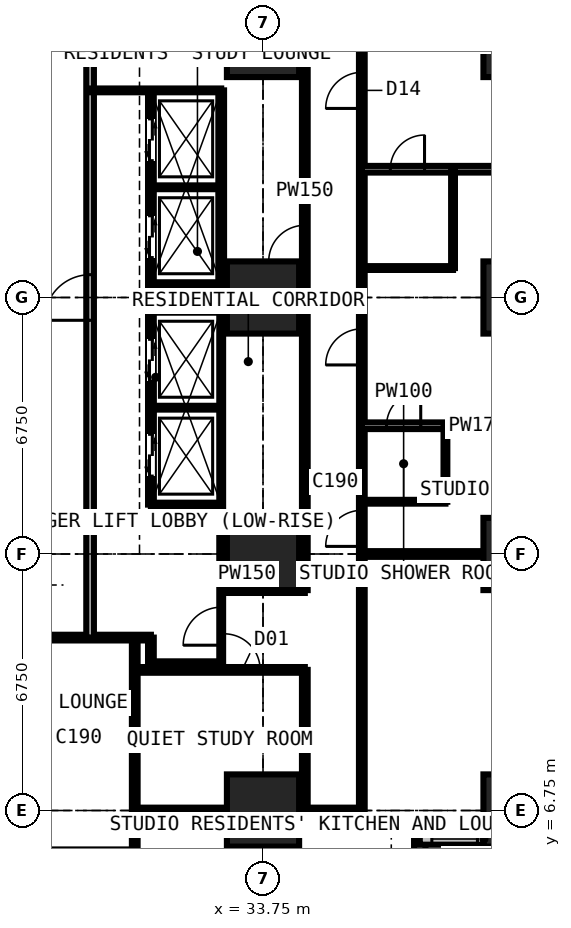
"""IFC4 building model, lengths in metres.
Left out: names, types, materials, properties, quantities, classifications, styles, units other than length and angle.
Written with IfcOpenShell. Run it as: python <this file> out.ifc"""

import sys

from ifc_helpers import new_model, si_unit, direction, frame, frame_2d, origin, origin_2d, place, context, subcontext, project, spatial, rectangle, extrude, element, fill, save


model = new_model("IFC4")
c1 = context("Model", 3, precision=1e-05, world=origin(), true_north=direction((0.0, 1.0)))
c2 = subcontext(c1, "Body", "Model", "MODEL_VIEW")
j1 = project(units=[si_unit("LENGTHUNIT", "METRE"), si_unit("PLANEANGLEUNIT", "RADIAN")], contexts=[c1])
p1 = place(None, origin())
s1 = spatial("IfcSite", under=j1, at=p1, CompositionType="ELEMENT")
p2 = place(p1, origin())
s2 = spatial("IfcBuilding", under=s1, at=p2, CompositionType="ELEMENT")
p3 = place(p2, frame((0.0, 0.0, 28.8)))
s3 = spatial("IfcBuildingStorey", under=s2, at=p3, CompositionType="ELEMENT", Elevation=28.8)
for number, where, z_axis, x_axis in (
    (1, (33.75, 6.75, 0.0), (0.0, 0.0, 1.0), (1.0, 0.0, 0.0)),
    (2, (33.75, 13.5, 0.0), (0.0, 0.0, 1.0), (1.0, 0.0, 0.0)),
    (3, (33.75, 20.25, 0.0), (0.0, 0.0, 1.0), (1.0, 0.0, 0.0)),
    (4, (33.75, 27.0, 0.0), (0.0, 0.0, 1.0), (1.0, 0.0, 0.0)),
    (5, (40.5, 6.75, 0.0), (0.0, 0.0, 1.0), (1.0, 0.0, 0.0)),
    (6, (40.5, 13.5, 0.0), (0.0, 0.0, 1.0), (1.0, 0.0, 0.0)),
    (7, (40.5, 20.25, 0.0), (0.0, 0.0, 1.0), (1.0, 0.0, 0.0)),
    (8, (40.5, 27.0, 0.0), (0.0, 0.0, 1.0), (1.0, 0.0, 0.0)),
):
    element("IfcColumn", number, at=place(p3, frame(where, z_axis=z_axis, x_axis=x_axis)), inside=s3, PredefinedType="COLUMN", context=c2, shape_type="SweptSolid", body=[
        extrude(rectangle(XDim=1.9, YDim=1.9, at=origin_2d()), origin(), (0.0, 0.0, 1.0), 3.6),
    ])
p4 = place(p3, frame((37.875, 2.625, 0.0), z_axis=(0.0, 0.0, 1.0), x_axis=(0.0, 1.0, 0.0)))
e9 = element("IfcWall", 9, at=p4, inside=s3, PredefinedType="SOLIDWALL", context=c2, shape_type="SweptSolid", body=[
    extrude(rectangle(XDim=3.375, YDim=0.3, at=frame_2d((1.688, 0.0))), origin(), (0.0, 0.0, 1.0), 3.375),
])
p5 = place(p4, frame((0.788, 0.0, 0.6)))
e10 = element("IfcOpeningElement", 10, at=p5, cuts=e9, PredefinedType="OPENING", context=c2, shape_type="SweptSolid", body=[
    extrude(rectangle(XDim=1.8, YDim=2.1, at=frame_2d((0.9, 1.05))), frame((0.0, 0.16, 0.0), z_axis=(0.0, -1.0, 0.0), x_axis=(1.0, 0.0, 0.0)), (0.0, 0.0, 1.0), 0.32),
])
p6 = place(p3, frame((37.875, 6.0, 0.0), z_axis=(0.0, 0.0, 1.0), x_axis=(1.0, 0.0, 0.0)))
e11 = element("IfcWall", 11, at=p6, inside=s3, PredefinedType="SOLIDWALL", context=c2, shape_type="SweptSolid", body=[
    extrude(rectangle(XDim=3.375, YDim=0.3, at=frame_2d((1.688, 0.0))), origin(), (0.0, 0.0, 1.0), 3.375),
])
p7 = place(p6, frame((0.317, 0.0, 0.9)))
e12 = element("IfcOpeningElement", 12, at=p7, cuts=e11, PredefinedType="OPENING", context=c2, shape_type="SweptSolid", body=[
    extrude(rectangle(XDim=1.2, YDim=1.8, at=frame_2d((0.6, 0.9))), frame((0.0, 0.16, 0.0), z_axis=(0.0, -1.0, 0.0), x_axis=(1.0, 0.0, 0.0)), (0.0, 0.0, 1.0), 0.32),
])
p8 = place(p3, frame((10.125, 11.3, 0.0), z_axis=(0.0, 0.0, 1.0), x_axis=(1.0, 0.0, 0.0)))
e13 = element("IfcWall", 13, at=p8, inside=s3, PredefinedType="PARTITIONING", context=c2, shape_type="SweptSolid", body=[
    extrude(rectangle(XDim=20.675, YDim=0.15, at=frame_2d((10.337, 0.0))), origin(), (0.0, 0.0, 1.0), 3.375),
])
p9 = place(p8, frame((1.775, 0.0, 0.0)))
e14 = element("IfcOpeningElement", 14, at=p9, cuts=e13, PredefinedType="OPENING", context=c2, shape_type="SweptSolid", body=[
    extrude(rectangle(XDim=1.0, YDim=2.2, at=frame_2d((0.5, 1.1))), frame((0.0, 0.085, 0.0), z_axis=(0.0, -1.0, 0.0), x_axis=(1.0, 0.0, 0.0)), (0.0, 0.0, 1.0), 0.17),
])
p10 = place(p8, frame((11.312, 0.0, 0.0)))
e15 = element("IfcOpeningElement", 15, at=p10, cuts=e13, PredefinedType="OPENING", context=c2, shape_type="SweptSolid", body=[
    extrude(rectangle(XDim=1.0, YDim=2.2, at=frame_2d((0.5, 1.1))), frame((0.0, 0.085, 0.0), z_axis=(0.0, -1.0, 0.0), x_axis=(1.0, 0.0, 0.0)), (0.0, 0.0, 1.0), 0.17),
])
p11 = place(p3, frame((29.2, 11.3, 0.0), z_axis=(0.0, 0.0, 1.0), x_axis=(0.0, 1.0, 0.0)))
e16 = element("IfcWall", 16, at=p11, inside=s3, PredefinedType="PARTITIONING", context=c2, shape_type="SweptSolid", body=[
    extrude(rectangle(XDim=17.9, YDim=0.2, at=frame_2d((8.95, 0.0))), origin(), (0.0, 0.0, 1.0), 3.375),
])
p12 = place(p11, frame((8.35, 0.0, 0.0)))
e17 = element("IfcOpeningElement", 17, at=p12, cuts=e16, PredefinedType="OPENING", context=c2, shape_type="SweptSolid", body=[
    extrude(rectangle(XDim=1.2, YDim=2.2, at=frame_2d((0.6, 1.1))), frame((0.0, 0.11, 0.0), z_axis=(0.0, -1.0, 0.0), x_axis=(1.0, 0.0, 0.0)), (0.0, 0.0, 1.0), 0.22),
])
p13 = place(p3, frame((29.2, 25.7, 0.0), z_axis=(0.0, 0.0, 1.0), x_axis=(1.0, 0.0, 0.0)))
e18 = element("IfcWall", 18, at=p13, inside=s3, PredefinedType="SHEAR", context=c2, shape_type="SweptSolid", body=[
    extrude(rectangle(XDim=3.45, YDim=0.1, at=frame_2d((1.725, 0.0))), origin(), (0.0, 0.0, 1.0), 3.375),
])
p14 = place(p3, frame((30.375, -0.734, 0.0), z_axis=(0.0, 0.0, 1.0), x_axis=(0.0, 1.0, 0.0)))
e19 = element("IfcWall", 19, at=p14, inside=s3, PredefinedType="PARTITIONING", context=c2, shape_type="SweptSolid", body=[
    extrude(rectangle(XDim=12.034, YDim=0.15, at=frame_2d((6.017, 0.0))), origin(), (0.0, 0.0, 1.0), 3.375),
])
p15 = place(p14, frame((5.134, 0.0, 0.0)))
e20 = element("IfcOpeningElement", 20, at=p15, cuts=e19, PredefinedType="OPENING", context=c2, shape_type="SweptSolid", body=[
    extrude(rectangle(XDim=1.0, YDim=2.2, at=frame_2d((0.5, 1.1))), frame((0.0, 0.085, 0.0), z_axis=(0.0, -1.0, 0.0), x_axis=(1.0, 0.0, 0.0)), (0.0, 0.0, 1.0), 0.17),
])
p16 = place(p3, frame((30.375, 6.75, 0.0), z_axis=(0.0, 0.0, 1.0), x_axis=(1.0, 0.0, 0.0)))
e21 = element("IfcWall", 21, at=p16, inside=s3, PredefinedType="PARTITIONING", context=c2, shape_type="SweptSolid", body=[
    extrude(rectangle(XDim=5.975, YDim=0.15, at=frame_2d((2.988, 0.0))), origin(), (0.0, 0.0, 1.0), 2.877),
])
p17 = place(p3, frame((30.375, 10.45, 0.0), z_axis=(0.0, 0.0, 1.0), x_axis=(1.0, 0.0, 0.0)))
e22 = element("IfcWall", 22, at=p17, inside=s3, PredefinedType="PARTITIONING", context=c2, shape_type="SweptSolid", body=[
    extrude(rectangle(XDim=4.475, YDim=0.15, at=frame_2d((2.238, 0.0))), origin(), (0.0, 0.0, 1.0), 3.375),
])
p18 = place(p17, frame((2.35, 0.0, 0.0)))
e23 = element("IfcOpeningElement", 23, at=p18, cuts=e22, PredefinedType="OPENING", context=c2, shape_type="SweptSolid", body=[
    extrude(rectangle(XDim=0.95, YDim=2.2, at=frame_2d((0.475, 1.1))), frame((0.0, 0.085, 0.0), z_axis=(0.0, -1.0, 0.0), x_axis=(1.0, 0.0, 0.0)), (0.0, 0.0, 1.0), 0.17),
])
p19 = place(p3, frame((30.8, 10.6, 0.0), z_axis=(0.0, 0.0, 1.0), x_axis=(0.0, 1.0, 0.0)))
e24 = element("IfcWall", 24, at=p19, inside=s3, PredefinedType="PARTITIONING", context=c2, shape_type="SweptSolid", body=[
    extrude(rectangle(XDim=0.7, YDim=0.15, at=frame_2d((0.35, 0.0))), origin(), (0.0, 0.0, 1.0), 3.375),
])
p20 = place(p3, frame((30.8, 10.6, 0.0), z_axis=(0.0, 0.0, 1.0), x_axis=(1.0, 0.0, 0.0)))
e25 = element("IfcWall", 25, at=p20, inside=s3, PredefinedType="PARTITIONING", context=c2, shape_type="SweptSolid", body=[
    extrude(rectangle(XDim=1.85, YDim=0.15, at=frame_2d((0.925, 0.0))), origin(), (0.0, 0.0, 1.0), 3.375),
])
p21 = place(p3, frame((30.8, 14.8, 0.0), z_axis=(0.0, 0.0, 1.0), x_axis=(0.0, 1.0, 0.0)))
e26 = element("IfcWall", 26, at=p21, inside=s3, PredefinedType="PARTITIONING", context=c2, shape_type="SweptSolid", body=[
    extrude(rectangle(XDim=10.9, YDim=0.15, at=frame_2d((5.45, 0.0))), origin(), (0.0, 0.0, 1.0), 3.375),
])
p22 = place(p21, frame((0.75, 0.0, 0.0)))
e27 = element("IfcOpeningElement", 27, at=p22, cuts=e26, PredefinedType="OPENING", context=c2, shape_type="SweptSolid", body=[
    extrude(rectangle(XDim=1.1, YDim=2.2, at=frame_2d((0.55, 1.1))), frame((0.0, 0.085, 0.0), z_axis=(0.0, -1.0, 0.0), x_axis=(1.0, 0.0, 0.0)), (0.0, 0.0, 1.0), 0.17),
])
p23 = place(p21, frame((3.25, 0.0, 0.0)))
e28 = element("IfcOpeningElement", 28, at=p23, cuts=e26, PredefinedType="OPENING", context=c2, shape_type="SweptSolid", body=[
    extrude(rectangle(XDim=1.1, YDim=2.2, at=frame_2d((0.55, 1.1))), frame((0.0, 0.085, 0.0), z_axis=(0.0, -1.0, 0.0), x_axis=(1.0, 0.0, 0.0)), (0.0, 0.0, 1.0), 0.17),
])
p24 = place(p21, frame((6.5, 0.0, 0.0)))
e29 = element("IfcOpeningElement", 29, at=p24, cuts=e26, PredefinedType="OPENING", context=c2, shape_type="SweptSolid", body=[
    extrude(rectangle(XDim=1.1, YDim=2.2, at=frame_2d((0.55, 1.1))), frame((0.0, 0.085, 0.0), z_axis=(0.0, -1.0, 0.0), x_axis=(1.0, 0.0, 0.0)), (0.0, 0.0, 1.0), 0.17),
])
p25 = place(p21, frame((9.05, 0.0, 0.0)))
e30 = element("IfcOpeningElement", 30, at=p25, cuts=e26, PredefinedType="OPENING", context=c2, shape_type="SweptSolid", body=[
    extrude(rectangle(XDim=1.1, YDim=2.2, at=frame_2d((0.55, 1.1))), frame((0.0, 0.085, 0.0), z_axis=(0.0, -1.0, 0.0), x_axis=(1.0, 0.0, 0.0)), (0.0, 0.0, 1.0), 0.17),
])
for number, where, z_axis, x_axis in (
    (31, (30.8, 14.8, 0.0), (0.0, 0.0, 1.0), (1.0, 0.0, 0.0)),
    (32, (30.8, 17.35, 0.0), (0.0, 0.0, 1.0), (1.0, 0.0, 0.0)),
    (33, (30.8, 19.9, 0.0), (0.0, 0.0, 1.0), (1.0, 0.0, 0.0)),
    (34, (30.8, 20.6, 0.0), (0.0, 0.0, 1.0), (1.0, 0.0, 0.0)),
    (35, (30.8, 23.15, 0.0), (0.0, 0.0, 1.0), (1.0, 0.0, 0.0)),
):
    element("IfcWall", number, at=place(p3, frame(where, z_axis=z_axis, x_axis=x_axis)), inside=s3, PredefinedType="SHEAR", context=c2, shape_type="SweptSolid", body=[
        extrude(rectangle(XDim=1.85, YDim=0.1, at=frame_2d((0.925, 0.0))), origin(), (0.0, 0.0, 1.0), 3.375),
    ])
p26 = place(p3, frame((32.65, 10.6, 0.0), z_axis=(0.0, 0.0, 1.0), x_axis=(0.0, 1.0, 0.0)))
e36 = element("IfcWall", 36, at=p26, inside=s3, PredefinedType="SHEAR", context=c2, shape_type="SweptSolid", body=[
    extrude(rectangle(XDim=9.3, YDim=0.1, at=frame_2d((4.65, 0.0))), origin(), (0.0, 0.0, 1.0), 3.375),
])
p27 = place(p26, frame((0.5, 0.0, 0.0)))
e37 = element("IfcOpeningElement", 37, at=p27, cuts=e36, PredefinedType="OPENING", context=c2, shape_type="SweptSolid", body=[
    extrude(rectangle(XDim=1.0, YDim=2.2, at=frame_2d((0.5, 1.1))), frame((0.0, 0.06, 0.0), z_axis=(0.0, -1.0, 0.0), x_axis=(1.0, 0.0, 0.0)), (0.0, 0.0, 1.0), 0.12),
])
p28 = place(p3, frame((32.65, 12.55, 0.0), z_axis=(0.0, 0.0, 1.0), x_axis=(1.0, 0.0, 0.0)))
e38 = element("IfcWall", 38, at=p28, inside=s3, PredefinedType="PARTITIONING", context=c2, shape_type="SweptSolid", body=[
    extrude(rectangle(XDim=2.2, YDim=0.15, at=frame_2d((1.1, 0.0))), origin(), (0.0, 0.0, 1.0), 3.375),
])
p29 = place(p3, frame((32.65, 20.6, 0.0), z_axis=(0.0, 0.0, 1.0), x_axis=(0.0, 1.0, 0.0)))
e39 = element("IfcWall", 39, at=p29, inside=s3, PredefinedType="PARTITIONING", context=c2, shape_type="SweptSolid", body=[
    extrude(rectangle(XDim=5.1, YDim=0.15, at=frame_2d((2.55, 0.0))), origin(), (0.0, 0.0, 1.0), 3.375),
])
p30 = place(p3, frame((34.85, 6.75, 0.0), z_axis=(0.0, 0.0, 1.0), x_axis=(0.0, 1.0, 0.0)))
e40 = element("IfcWall", 40, at=p30, inside=s3, PredefinedType="PARTITIONING", context=c2, shape_type="SweptSolid", body=[
    extrude(rectangle(XDim=3.7, YDim=0.15, at=frame_2d((1.85, 0.0))), origin(), (0.0, 0.0, 1.0), 3.375),
])
p31 = place(p3, frame((34.85, 12.55, 0.0), z_axis=(0.0, 0.0, 1.0), x_axis=(0.0, 1.0, 0.0)))
e41 = element("IfcWall", 41, at=p31, inside=s3, PredefinedType="PARTITIONING", context=c2, shape_type="SweptSolid", body=[
    extrude(rectangle(XDim=17.825, YDim=0.15, at=frame_2d((8.913, 0.0))), origin(), (0.0, 0.0, 1.0), 3.375),
])
p32 = place(p31, frame((8.65, 0.0, 0.0)))
e42 = element("IfcOpeningElement", 42, at=p32, cuts=e41, PredefinedType="OPENING", context=c2, shape_type="SweptSolid", body=[
    extrude(rectangle(XDim=0.95, YDim=2.2, at=frame_2d((0.475, 1.1))), frame((0.0, 0.085, 0.0), z_axis=(0.0, -1.0, 0.0), x_axis=(1.0, 0.0, 0.0)), (0.0, 0.0, 1.0), 0.17),
])
p33 = place(p3, frame((36.35, 6.75, 0.0), z_axis=(0.0, 0.0, 1.0), x_axis=(0.0, 1.0, 0.0)))
e43 = element("IfcWall", 43, at=p33, inside=s3, PredefinedType="PARTITIONING", context=c2, shape_type="SweptSolid", body=[
    extrude(rectangle(XDim=23.625, YDim=0.15, at=frame_2d((11.812, 0.0))), origin(), (0.0, 0.0, 1.0), 3.375),
])
p34 = place(p33, frame((18.475, 0.0, 0.0)))
e44 = element("IfcOpeningElement", 44, at=p34, cuts=e43, PredefinedType="OPENING", context=c2, shape_type="SweptSolid", body=[
    extrude(rectangle(XDim=0.95, YDim=2.2, at=frame_2d((0.475, 1.1))), frame((0.0, 0.085, 0.0), z_axis=(0.0, -1.0, 0.0), x_axis=(1.0, 0.0, 0.0)), (0.0, 0.0, 1.0), 0.17),
])
p35 = place(p33, frame((11.725, 0.0, 0.0)))
e45 = element("IfcOpeningElement", 45, at=p35, cuts=e43, PredefinedType="OPENING", context=c2, shape_type="SweptSolid", body=[
    extrude(rectangle(XDim=0.95, YDim=2.2, at=frame_2d((0.475, 1.1))), frame((0.0, 0.085, 0.0), z_axis=(0.0, -1.0, 0.0), x_axis=(1.0, 0.0, 0.0)), (0.0, 0.0, 1.0), 0.17),
])
p36 = place(p33, frame((6.95, 0.0, 0.0)))
e46 = element("IfcOpeningElement", 46, at=p36, cuts=e43, PredefinedType="OPENING", context=c2, shape_type="SweptSolid", body=[
    extrude(rectangle(XDim=0.95, YDim=2.2, at=frame_2d((0.475, 1.1))), frame((0.0, 0.085, 0.0), z_axis=(0.0, -1.0, 0.0), x_axis=(1.0, 0.0, 0.0)), (0.0, 0.0, 1.0), 0.17),
])
p37 = place(p3, frame((36.35, 13.5, 0.0), z_axis=(0.0, 0.0, 1.0), x_axis=(1.0, 0.0, 0.0)))
e47 = element("IfcWall", 47, at=p37, inside=s3, PredefinedType="PARTITIONING", context=c2, shape_type="SweptSolid", body=[
    extrude(rectangle(XDim=4.884, YDim=0.15, at=frame_2d((2.442, 0.0))), origin(), (0.0, 0.0, 1.0), 2.61),
])
p38 = place(p3, frame((36.35, 14.875, 0.0), z_axis=(0.0, 0.0, 1.0), x_axis=(1.0, 0.0, 0.0)))
e48 = element("IfcWall", 48, at=p38, inside=s3, PredefinedType="PARTITIONING", context=c2, shape_type="SweptSolid", body=[
    extrude(rectangle(XDim=2.2, YDim=0.1, at=frame_2d((1.1, 0.0))), origin(), (0.0, 0.0, 1.0), 3.375),
])
p39 = place(p3, frame((36.35, 16.875, 0.0), z_axis=(0.0, 0.0, 1.0), x_axis=(1.0, 0.0, 0.0)))
e49 = element("IfcWall", 49, at=p39, inside=s3, PredefinedType="PARTITIONING", context=c2, shape_type="SweptSolid", body=[
    extrude(rectangle(XDim=4.884, YDim=0.175, at=frame_2d((2.442, 0.0))), origin(), (0.0, 0.0, 1.0), 3.375),
])
p40 = place(p39, frame((0.65, 0.0, 0.0)))
e50 = element("IfcOpeningElement", 50, at=p40, cuts=e49, PredefinedType="OPENING", context=c2, shape_type="SweptSolid", body=[
    extrude(rectangle(XDim=0.9, YDim=2.2, at=frame_2d((0.45, 1.1))), frame((0.0, 0.097, 0.0), z_axis=(0.0, -1.0, 0.0), x_axis=(1.0, 0.0, 0.0)), (0.0, 0.0, 1.0), 0.195),
])
p41 = place(p3, frame((36.35, 21.025, 0.0), z_axis=(0.0, 0.0, 1.0), x_axis=(1.0, 0.0, 0.0)))
e51 = element("IfcWall", 51, at=p41, inside=s3, PredefinedType="PARTITIONING", context=c2, shape_type="SweptSolid", body=[
    extrude(rectangle(XDim=2.4, YDim=0.1, at=frame_2d((1.2, 0.0))), origin(), (0.0, 0.0, 1.0), 3.375),
])
p42 = place(p3, frame((36.35, 23.625, 0.0), z_axis=(0.0, 0.0, 1.0), x_axis=(1.0, 0.0, 0.0)))
e52 = element("IfcWall", 52, at=p42, inside=s3, PredefinedType="PARTITIONING", context=c2, shape_type="SweptSolid", body=[
    extrude(rectangle(XDim=4.884, YDim=0.175, at=frame_2d((2.442, 0.0))), origin(), (0.0, 0.0, 1.0), 3.375),
])
p43 = place(p42, frame((0.75, 0.0, 0.0)))
e53 = element("IfcOpeningElement", 53, at=p43, cuts=e52, PredefinedType="OPENING", context=c2, shape_type="SweptSolid", body=[
    extrude(rectangle(XDim=0.9, YDim=2.2, at=frame_2d((0.45, 1.1))), frame((0.0, 0.097, 0.0), z_axis=(0.0, -1.0, 0.0), x_axis=(1.0, 0.0, 0.0)), (0.0, 0.0, 1.0), 0.195),
])
p44 = place(p3, frame((38.55, 14.875, 0.0), z_axis=(0.0, 0.0, 1.0), x_axis=(0.0, 1.0, 0.0)))
e54 = element("IfcWall", 54, at=p44, inside=s3, PredefinedType="PARTITIONING", context=c2, shape_type="SweptSolid", body=[
    extrude(rectangle(XDim=2.0, YDim=0.1, at=frame_2d((1.0, 0.0))), origin(), (0.0, 0.0, 1.0), 3.375),
])
p45 = place(p3, frame((38.75, 21.025, 0.0), z_axis=(0.0, 0.0, 1.0), x_axis=(0.0, 1.0, 0.0)))
e55 = element("IfcWall", 55, at=p45, inside=s3, PredefinedType="PARTITIONING", context=c2, shape_type="SweptSolid", body=[
    extrude(rectangle(XDim=2.6, YDim=0.1, at=frame_2d((1.3, 0.0))), origin(), (0.0, 0.0, 1.0), 3.375),
])
p46 = place(p7, origin())
e56 = element("IfcWindow", 56, at=p46, inside=s3, PartitioningType="SINGLE_PANEL", PredefinedType="WINDOW", context=c2, shape_type="SweptSolid", body=[
    extrude(rectangle(XDim=1.2, YDim=1.8, at=frame_2d((0.6, 0.9))), frame((0.0, 0.03, 0.0), z_axis=(0.0, -1.0, 0.0), x_axis=(1.0, 0.0, 0.0)), (0.0, 0.0, 1.0), 0.06),
])
fill(e12, e56)
p47 = place(p34, origin())
e57 = element("IfcDoor", 57, at=p47, inside=s3, OperationType="SINGLE_SWING_LEFT", PredefinedType="DOOR", context=c2, shape_type="SweptSolid", body=[
    extrude(rectangle(XDim=0.95, YDim=2.2, at=frame_2d((0.475, 1.1))), frame((0.0, 0.025, 0.0), z_axis=(0.0, -1.0, 0.0), x_axis=(1.0, 0.0, 0.0)), (0.0, 0.0, 1.0), 0.05),
])
fill(e44, e57)
p48 = place(p35, origin())
e58 = element("IfcDoor", 58, at=p48, inside=s3, OperationType="SINGLE_SWING_LEFT", PredefinedType="DOOR", context=c2, shape_type="SweptSolid", body=[
    extrude(rectangle(XDim=0.95, YDim=2.2, at=frame_2d((0.475, 1.1))), frame((0.0, 0.025, 0.0), z_axis=(0.0, -1.0, 0.0), x_axis=(1.0, 0.0, 0.0)), (0.0, 0.0, 1.0), 0.05),
])
fill(e45, e58)
p49 = place(p43, origin())
e59 = element("IfcDoor", 59, at=p49, inside=s3, OperationType="SINGLE_SWING_RIGHT", PredefinedType="DOOR", context=c2, shape_type="SweptSolid", body=[
    extrude(rectangle(XDim=0.9, YDim=2.2, at=frame_2d((0.45, 1.1))), frame((0.0, 0.025, 0.0), z_axis=(0.0, -1.0, 0.0), x_axis=(1.0, 0.0, 0.0)), (0.0, 0.0, 1.0), 0.05),
])
fill(e53, e59)
p50 = place(p36, origin())
e60 = element("IfcDoor", 60, at=p50, inside=s3, OperationType="SINGLE_SWING_LEFT", PredefinedType="DOOR", context=c2, shape_type="SweptSolid", body=[
    extrude(rectangle(XDim=0.95, YDim=2.2, at=frame_2d((0.475, 1.1))), frame((0.0, 0.025, 0.0), z_axis=(0.0, -1.0, 0.0), x_axis=(1.0, 0.0, 0.0)), (0.0, 0.0, 1.0), 0.05),
])
fill(e46, e60)
p51 = place(p40, origin())
e61 = element("IfcDoor", 61, at=p51, inside=s3, OperationType="SINGLE_SWING_RIGHT", PredefinedType="DOOR", context=c2, shape_type="SweptSolid", body=[
    extrude(rectangle(XDim=0.9, YDim=2.2, at=frame_2d((0.45, 1.1))), frame((0.0, 0.025, 0.0), z_axis=(0.0, -1.0, 0.0), x_axis=(1.0, 0.0, 0.0)), (0.0, 0.0, 1.0), 0.05),
])
fill(e50, e61)
p52 = place(p27, origin())
e62 = element("IfcDoor", 62, at=p52, inside=s3, OperationType="SINGLE_SWING_LEFT", PredefinedType="DOOR", context=c2, shape_type="SweptSolid", body=[
    extrude(rectangle(XDim=1.0, YDim=2.2, at=frame_2d((0.5, 1.1))), frame((0.0, 0.025, 0.0), z_axis=(0.0, -1.0, 0.0), x_axis=(1.0, 0.0, 0.0)), (0.0, 0.0, 1.0), 0.05),
])
fill(e37, e62)
p53 = place(p32, origin())
e63 = element("IfcDoor", 63, at=p53, inside=s3, OperationType="SINGLE_SWING_LEFT", PredefinedType="DOOR", context=c2, shape_type="SweptSolid", body=[
    extrude(rectangle(XDim=0.95, YDim=2.2, at=frame_2d((0.475, 1.1))), frame((0.0, 0.025, 0.0), z_axis=(0.0, -1.0, 0.0), x_axis=(1.0, 0.0, 0.0)), (0.0, 0.0, 1.0), 0.05),
])
fill(e42, e63)
p54 = place(p18, origin())
e64 = element("IfcDoor", 64, at=p54, inside=s3, OperationType="SINGLE_SWING_LEFT", PredefinedType="DOOR", context=c2, shape_type="SweptSolid", body=[
    extrude(rectangle(XDim=0.95, YDim=2.2, at=frame_2d((0.475, 1.1))), frame((0.0, 0.025, 0.0), z_axis=(0.0, -1.0, 0.0), x_axis=(1.0, 0.0, 0.0)), (0.0, 0.0, 1.0), 0.05),
])
fill(e23, e64)
p55 = place(p22, origin())
e65 = element("IfcDoor", 65, at=p55, inside=s3, OperationType="DOUBLE_DOOR_SLIDING", PredefinedType="DOOR", context=c2, shape_type="SweptSolid", body=[
    extrude(rectangle(XDim=1.1, YDim=2.2, at=frame_2d((0.55, 1.1))), frame((0.0, 0.025, 0.0), z_axis=(0.0, -1.0, 0.0), x_axis=(1.0, 0.0, 0.0)), (0.0, 0.0, 1.0), 0.05),
])
fill(e27, e65)
p56 = place(p23, origin())
e66 = element("IfcDoor", 66, at=p56, inside=s3, OperationType="DOUBLE_DOOR_SLIDING", PredefinedType="DOOR", context=c2, shape_type="SweptSolid", body=[
    extrude(rectangle(XDim=1.1, YDim=2.2, at=frame_2d((0.55, 1.1))), frame((0.0, 0.025, 0.0), z_axis=(0.0, -1.0, 0.0), x_axis=(1.0, 0.0, 0.0)), (0.0, 0.0, 1.0), 0.05),
])
fill(e28, e66)
p57 = place(p24, origin())
e67 = element("IfcDoor", 67, at=p57, inside=s3, OperationType="DOUBLE_DOOR_SLIDING", PredefinedType="DOOR", context=c2, shape_type="SweptSolid", body=[
    extrude(rectangle(XDim=1.1, YDim=2.2, at=frame_2d((0.55, 1.1))), frame((0.0, 0.025, 0.0), z_axis=(0.0, -1.0, 0.0), x_axis=(1.0, 0.0, 0.0)), (0.0, 0.0, 1.0), 0.05),
])
fill(e29, e67)
p58 = place(p25, origin())
e68 = element("IfcDoor", 68, at=p58, inside=s3, OperationType="DOUBLE_DOOR_SLIDING", PredefinedType="DOOR", context=c2, shape_type="SweptSolid", body=[
    extrude(rectangle(XDim=1.1, YDim=2.2, at=frame_2d((0.55, 1.1))), frame((0.0, 0.025, 0.0), z_axis=(0.0, -1.0, 0.0), x_axis=(1.0, 0.0, 0.0)), (0.0, 0.0, 1.0), 0.05),
])
fill(e30, e68)
p59 = place(p12, origin())
e69 = element("IfcDoor", 69, at=p59, inside=s3, OperationType="DOUBLE_DOOR_SINGLE_SWING", PredefinedType="DOOR", context=c2, shape_type="SweptSolid", body=[
    extrude(rectangle(XDim=1.2, YDim=2.2, at=frame_2d((0.6, 1.1))), frame((0.0, 0.025, 0.0), z_axis=(0.0, -1.0, 0.0), x_axis=(1.0, 0.0, 0.0)), (0.0, 0.0, 1.0), 0.05),
])
fill(e17, e69)
save(model, sys.argv[1])
